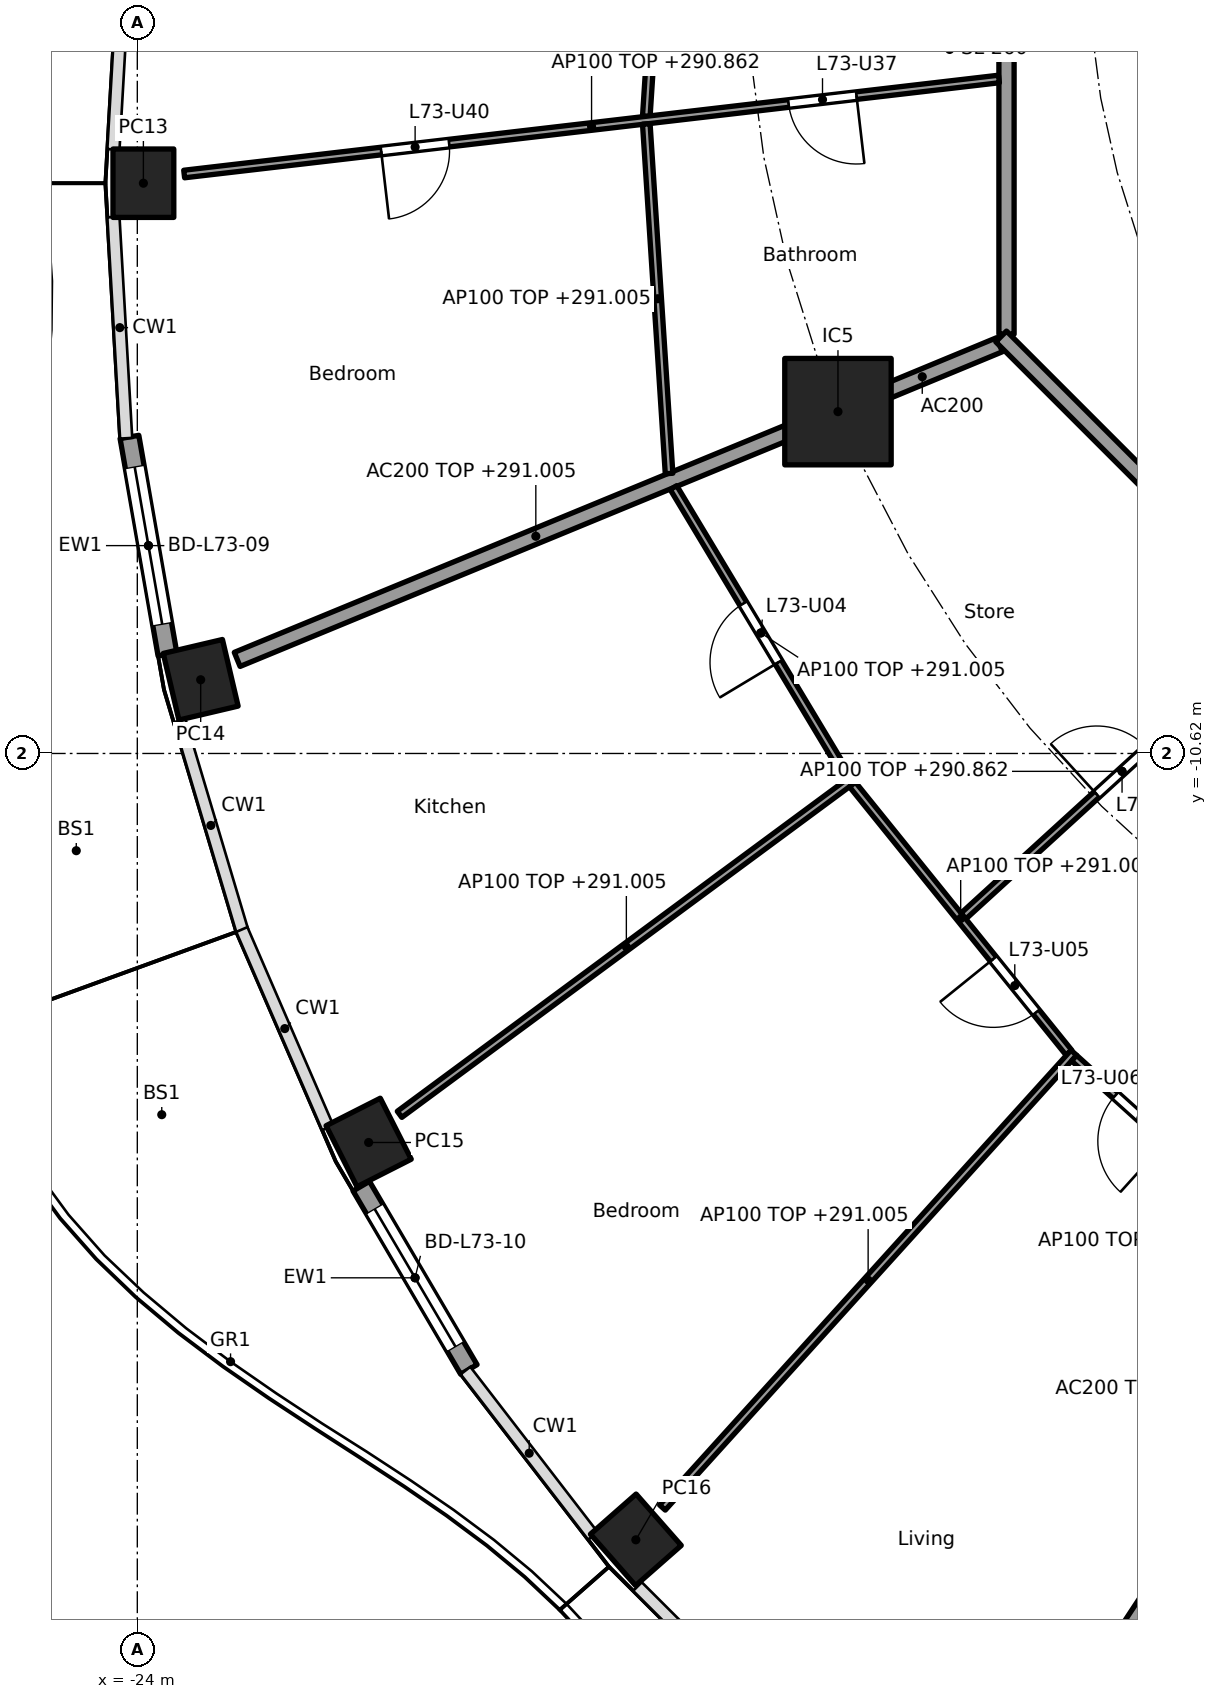
"""IFC4 building model, lengths in metres.
Left out: names, types, materials, properties, quantities, classifications, styles, units other than length and angle.
Written with IfcOpenShell. Run it as: python <this file> out.ifc"""

import sys

from ifc_helpers import new_model, si_unit, direction, frame, frame_2d, origin, origin_2d, place, context, subcontext, project, spatial, rectangle, hollow_rectangle, extrude, element, fill, save


model = new_model("IFC4")
c1 = context("Model", 3, precision=1e-05, world=origin(), true_north=direction((0.0, 1.0)))
c2 = subcontext(c1, "Body", "Model", "MODEL_VIEW")
j1 = project(units=[si_unit("LENGTHUNIT", "METRE"), si_unit("PLANEANGLEUNIT", "RADIAN")], contexts=[c1])
p1 = place(None, origin())
s1 = spatial("IfcSite", under=j1, at=p1, CompositionType="ELEMENT")
p2 = place(p1, origin())
s2 = spatial("IfcBuilding", under=s1, at=p2, CompositionType="ELEMENT")
p3 = place(p2, frame((0.0, 0.0, 288.1)))
s3 = spatial("IfcBuildingStorey", under=s2, at=p3, CompositionType="ELEMENT", Elevation=288.1)
for number, where, z_axis, x_axis in (
    (1, (-23.92, -3.118, 0.0), (0.0, 0.0, 1.0), (0.0, -1.0, 0.0)),
    (2, (-23.166, -9.65, 0.0), (0.0, 0.0, 1.0), (0.229, -0.973, 0.0)),
    (3, (-20.957, -15.738, 0.0), (0.0, 0.0, 1.0), (0.452, -0.892, 0.0)),
    (4, (-17.441, -20.965, 0.0), (0.0, 0.0, 1.0), (0.66, -0.751, 0.0)),
):
    element("IfcColumn", number, at=place(p3, frame(where, z_axis=z_axis, x_axis=x_axis)), inside=s3, PredefinedType="COLUMN", context=c2, shape_type="SweptSolid", body=[
        extrude(hollow_rectangle(XDim=0.9, YDim=0.8, WallThickness=0.028, at=origin_2d()), origin(), (0.0, 0.0, 1.0), 3.7),
    ])
p4 = place(p3, frame((-14.782, -6.123, 0.0), z_axis=(0.0, 0.0, 1.0), x_axis=(1.0, 0.0, 0.0)))
e5 = element("IfcColumn", 5, at=p4, inside=s3, PredefinedType="COLUMN", context=c2, shape_type="SweptSolid", body=[
    extrude(rectangle(XDim=1.4, YDim=1.4, at=origin_2d()), origin(), (0.0, 0.0, 1.0), 3.7),
])
p5 = place(p3, frame((-23.604, -9.315, 0.0), z_axis=(0.0, 0.0, 1.0), x_axis=(-0.172182411767, 0.985065082661, 0.0)))
e6 = element("IfcWall", 6, at=p5, inside=s3, PredefinedType="SOLIDWALL", context=c2, shape_type="SweptSolid", body=[
    extrude(rectangle(XDim=2.903, YDim=0.25, at=frame_2d((1.451, 0.0))), origin(), (0.0, 0.0, 1.0), 3.44),
])
p6 = place(p5, frame((0.401, 0.0, 0.0)))
e7 = element("IfcOpeningElement", 7, at=p6, cuts=e6, PredefinedType="OPENING", context=c2, shape_type="SweptSolid", body=[
    extrude(rectangle(XDim=2.1, YDim=2.4, at=frame_2d((1.05, 1.2))), frame((0.0, 0.135, 0.0), z_axis=(0.0, -1.0, 0.0), x_axis=(1.0, 0.0, 0.0)), (0.0, 0.0, 1.0), 0.27),
])
p7 = place(p3, frame((-19.638, -18.724, 0.0), z_axis=(0.0, 0.0, 1.0), x_axis=(-0.506371364425, 0.862315511452, 0.0)))
e8 = element("IfcWall", 8, at=p7, inside=s3, PredefinedType="SOLIDWALL", context=c2, shape_type="SweptSolid", body=[
    extrude(rectangle(XDim=2.796, YDim=0.25, at=frame_2d((1.398, 0.0))), origin(), (0.0, 0.0, 1.0), 3.44),
])
p8 = place(p7, frame((0.348, 0.0, 0.0)))
e9 = element("IfcOpeningElement", 9, at=p8, cuts=e8, PredefinedType="OPENING", context=c2, shape_type="SweptSolid", body=[
    extrude(rectangle(XDim=2.1, YDim=2.4, at=frame_2d((1.05, 1.2))), frame((0.0, 0.135, 0.0), z_axis=(0.0, -1.0, 0.0), x_axis=(1.0, 0.0, 0.0)), (0.0, 0.0, 1.0), 0.27),
])
p9 = place(p3, frame((-12.657, -5.243, 0.0), z_axis=(0.0, 0.0, 1.0), x_axis=(-0.923859888513, -0.38273085373, 0.0)))
e10 = element("IfcWall", 10, at=p9, inside=s3, PredefinedType="PARTITIONING", context=c2, shape_type="SweptSolid", body=[
    extrude(rectangle(XDim=2.199, YDim=0.2, at=frame_2d((1.1, 0.0))), origin(), (0.0, 0.0, 1.0), 3.44),
])
p10 = place(p3, frame((-14.828, -6.142, 0.0), z_axis=(0.0, 0.0, 1.0), x_axis=(-0.924478087429, -0.381235184451, 0.0)))
e11 = element("IfcWall", 11, at=p10, inside=s3, PredefinedType="PARTITIONING", context=c2, shape_type="SweptSolid", body=[
    extrude(rectangle(XDim=8.499, YDim=0.2, at=frame_2d((4.25, 0.0))), origin(), (0.0, 0.0, 1.0), 2.905),
])
p11 = place(p3, frame((-6.151, -14.824, 0.0), z_axis=(0.0, 0.0, 1.0), x_axis=(-0.549345577828, -0.835595258556, 0.0)))
e12 = element("IfcWall", 12, at=p11, inside=s3, PredefinedType="PARTITIONING", context=c2, shape_type="SweptSolid", body=[
    extrude(rectangle(XDim=11.62, YDim=0.2, at=frame_2d((5.81, 0.0))), origin(), (0.0, 0.0, 1.0), 2.905),
])
p12 = place(p3, frame((-12.565, 5.304, 0.0), z_axis=(0.0, 0.0, 1.0), x_axis=(0.0, -1.0, 0.0)))
e13 = element("IfcWall", 13, at=p12, inside=s3, PredefinedType="PARTITIONING", context=c2, shape_type="SweptSolid", body=[
    extrude(rectangle(XDim=10.409, YDim=0.2, at=frame_2d((5.205, 0.0))), origin(), (0.0, 0.0, 1.0), 3.44),
])
p13 = place(p12, frame((4.804, 0.0, 0.0)))
e14 = element("IfcOpeningElement", 14, at=p13, cuts=e13, PredefinedType="OPENING", context=c2, shape_type="SweptSolid", body=[
    extrude(rectangle(XDim=1.0, YDim=2.1, at=frame_2d((0.5, 1.05))), frame((0.0, 0.11, 0.0), z_axis=(0.0, -1.0, 0.0), x_axis=(1.0, 0.0, 0.0)), (0.0, 0.0, 1.0), 0.22),
])
p14 = place(p3, frame((-12.635, -5.134, 0.0), z_axis=(0.0, 0.0, 1.0), x_axis=(0.707106781187, -0.707106781187, 0.0)))
e15 = element("IfcWall", 15, at=p14, inside=s3, PredefinedType="PARTITIONING", context=c2, shape_type="SweptSolid", body=[
    extrude(rectangle(XDim=10.609, YDim=0.2, at=frame_2d((5.305, 0.0))), origin(), (0.0, 0.0, 1.0), 3.44),
])
p15 = place(p14, frame((6.539, 0.0, 0.0)))
e16 = element("IfcOpeningElement", 16, at=p15, cuts=e15, PredefinedType="OPENING", context=c2, shape_type="SweptSolid", body=[
    extrude(rectangle(XDim=1.0, YDim=2.1, at=frame_2d((0.5, 1.05))), frame((0.0, 0.11, 0.0), z_axis=(0.0, -1.0, 0.0), x_axis=(1.0, 0.0, 0.0)), (0.0, 0.0, 1.0), 0.22),
])
p16 = place(p3, frame((-17.002, 2.409, 0.0), z_axis=(0.0, 0.0, 1.0), x_axis=(-0.064855550758, -0.997894662545, 0.0)))
e17 = element("IfcWall", 17, at=p16, inside=s3, PredefinedType="PARTITIONING", context=c2, shape_type="SweptSolid", body=[
    extrude(rectangle(XDim=4.656, YDim=0.1, at=frame_2d((2.328, 0.0))), origin(), (0.0, 0.0, 1.0), 2.905),
])
p17 = place(p3, frame((-12.664, -1.746, 0.0), z_axis=(0.0, 0.0, 1.0), x_axis=(-0.993264397529, -0.115869912409, 0.0)))
e18 = element("IfcWall", 18, at=p17, inside=s3, PredefinedType="PARTITIONING", context=c2, shape_type="SweptSolid", body=[
    extrude(rectangle(XDim=10.792, YDim=0.1, at=frame_2d((5.396, 0.0))), origin(), (0.0, 0.0, 1.0), 2.762),
])
p18 = place(p17, frame((1.887, 0.0, 0.0)))
e19 = element("IfcOpeningElement", 19, at=p18, cuts=e18, PredefinedType="OPENING", context=c2, shape_type="SweptSolid", body=[
    extrude(rectangle(XDim=0.9, YDim=2.1, at=frame_2d((0.45, 1.05))), frame((0.0, 0.06, 0.0), z_axis=(0.0, -1.0, 0.0), x_axis=(1.0, 0.0, 0.0)), (0.0, 0.0, 1.0), 0.12),
])
p19 = place(p17, frame((7.283, 0.0, 0.0)))
e20 = element("IfcOpeningElement", 20, at=p19, cuts=e18, PredefinedType="OPENING", context=c2, shape_type="SweptSolid", body=[
    extrude(rectangle(XDim=0.9, YDim=2.1, at=frame_2d((0.45, 1.05))), frame((0.0, 0.06, 0.0), z_axis=(0.0, -1.0, 0.0), x_axis=(1.0, 0.0, 0.0)), (0.0, 0.0, 1.0), 0.12),
])
p20 = place(p3, frame((-17.304, -2.338, 0.0), z_axis=(0.0, 0.0, 1.0), x_axis=(0.06500001157, -0.997885263192, 0.0)))
e21 = element("IfcWall", 21, at=p20, inside=s3, PredefinedType="PARTITIONING", context=c2, shape_type="SweptSolid", body=[
    extrude(rectangle(XDim=4.609, YDim=0.1, at=frame_2d((2.304, 0.0))), origin(), (0.0, 0.0, 1.0), 2.905),
])
p21 = place(p3, frame((-16.946, -7.122, 0.0), z_axis=(0.0, 0.0, 1.0), x_axis=(0.514994556856, -0.857193447483, 0.0)))
e22 = element("IfcWall", 22, at=p21, inside=s3, PredefinedType="PARTITIONING", context=c2, shape_type="SweptSolid", body=[
    extrude(rectangle(XDim=4.462, YDim=0.1, at=frame_2d((2.231, 0.0))), origin(), (0.0, 0.0, 1.0), 2.905),
])
p22 = place(p21, frame((1.781, 0.0, 0.0)))
e23 = element("IfcOpeningElement", 23, at=p22, cuts=e22, PredefinedType="OPENING", context=c2, shape_type="SweptSolid", body=[
    extrude(rectangle(XDim=0.9, YDim=2.1, at=frame_2d((0.45, 1.05))), frame((0.0, 0.06, 0.0), z_axis=(0.0, -1.0, 0.0), x_axis=(1.0, 0.0, 0.0)), (0.0, 0.0, 1.0), 0.12),
])
p23 = place(p3, frame((-14.582, -10.96, 0.0), z_axis=(0.0, 0.0, 1.0), x_axis=(-0.804405200554, -0.594081032623, 0.0)))
e24 = element("IfcWall", 24, at=p23, inside=s3, PredefinedType="PARTITIONING", context=c2, shape_type="SweptSolid", body=[
    extrude(rectangle(XDim=7.418, YDim=0.1, at=frame_2d((3.709, 0.0))), origin(), (0.0, 0.0, 1.0), 2.905),
])
p24 = place(p3, frame((-14.591, -11.029, 0.0), z_axis=(0.0, 0.0, 1.0), x_axis=(0.628170338674, -0.778075848237, 0.0)))
e25 = element("IfcWall", 25, at=p24, inside=s3, PredefinedType="PARTITIONING", context=c2, shape_type="SweptSolid", body=[
    extrude(rectangle(XDim=4.532, YDim=0.1, at=frame_2d((2.266, 0.0))), origin(), (0.0, 0.0, 1.0), 2.905),
])
p25 = place(p24, frame((2.949, 0.0, 0.0)))
e26 = element("IfcOpeningElement", 26, at=p25, cuts=e25, PredefinedType="OPENING", context=c2, shape_type="SweptSolid", body=[
    extrude(rectangle(XDim=0.9, YDim=2.1, at=frame_2d((0.45, 1.05))), frame((0.0, 0.06, 0.0), z_axis=(0.0, -1.0, 0.0), x_axis=(1.0, 0.0, 0.0)), (0.0, 0.0, 1.0), 0.12),
])
p26 = place(p3, frame((-8.958, -8.952, 0.0), z_axis=(0.0, 0.0, 1.0), x_axis=(-0.73876526954, -0.673962815385, 0.0)))
e27 = element("IfcWall", 27, at=p26, inside=s3, PredefinedType="PARTITIONING", context=c2, shape_type="SweptSolid", body=[
    extrude(rectangle(XDim=5.647, YDim=0.1, at=frame_2d((2.824, 0.0))), origin(), (0.0, 0.0, 1.0), 2.762),
])
p27 = place(p26, frame((2.374, 0.0, 0.0)))
e28 = element("IfcOpeningElement", 28, at=p27, cuts=e27, PredefinedType="OPENING", context=c2, shape_type="SweptSolid", body=[
    extrude(rectangle(XDim=0.9, YDim=2.1, at=frame_2d((0.45, 1.05))), frame((0.0, 0.06, 0.0), z_axis=(0.0, -1.0, 0.0), x_axis=(1.0, 0.0, 0.0)), (0.0, 0.0, 1.0), 0.12),
])
p28 = place(p3, frame((-11.679, -14.557, 0.0), z_axis=(0.0, 0.0, 1.0), x_axis=(-0.670800011545, -0.741638284146, 0.0)))
e29 = element("IfcWall", 29, at=p28, inside=s3, PredefinedType="PARTITIONING", context=c2, shape_type="SweptSolid", body=[
    extrude(rectangle(XDim=8.068, YDim=0.1, at=frame_2d((4.034, 0.0))), origin(), (0.0, 0.0, 1.0), 2.905),
])
p29 = place(p3, frame((-11.676, -14.628, 0.0), z_axis=(0.0, 0.0, 1.0), x_axis=(0.74245829867, -0.669892285921, 0.0)))
e30 = element("IfcWall", 30, at=p29, inside=s3, PredefinedType="PARTITIONING", context=c2, shape_type="SweptSolid", body=[
    extrude(rectangle(XDim=4.68, YDim=0.1, at=frame_2d((2.34, 0.0))), origin(), (0.0, 0.0, 1.0), 2.905),
])
p30 = place(p29, frame((0.732, 0.0, 0.0)))
e31 = element("IfcOpeningElement", 31, at=p30, cuts=e30, PredefinedType="OPENING", context=c2, shape_type="SweptSolid", body=[
    extrude(rectangle(XDim=0.9, YDim=2.1, at=frame_2d((0.45, 1.05))), frame((0.0, 0.06, 0.0), z_axis=(0.0, -1.0, 0.0), x_axis=(1.0, 0.0, 0.0)), (0.0, 0.0, 1.0), 0.12),
])
p31 = place(p6, origin())
e32 = element("IfcDoor", 32, at=p31, inside=s3, OperationType="SLIDING_TO_LEFT", PredefinedType="DOOR", context=c2, shape_type="SweptSolid", body=[
    extrude(rectangle(XDim=2.1, YDim=2.4, at=frame_2d((1.05, 1.2))), frame((0.0, 0.025, 0.0), z_axis=(0.0, -1.0, 0.0), x_axis=(1.0, 0.0, 0.0)), (0.0, 0.0, 1.0), 0.05),
])
fill(e7, e32)
p32 = place(p8, origin())
e33 = element("IfcDoor", 33, at=p32, inside=s3, OperationType="SLIDING_TO_LEFT", PredefinedType="DOOR", context=c2, shape_type="SweptSolid", body=[
    extrude(rectangle(XDim=2.1, YDim=2.4, at=frame_2d((1.05, 1.2))), frame((0.0, 0.025, 0.0), z_axis=(0.0, -1.0, 0.0), x_axis=(1.0, 0.0, 0.0)), (0.0, 0.0, 1.0), 0.05),
])
fill(e9, e33)
p33 = place(p27, frame((0.9, 0.0, 0.0), x_axis=(-1.0, 0.0, 0.0)))
e34 = element("IfcDoor", 34, at=p33, inside=s3, OperationType="SINGLE_SWING_LEFT", PredefinedType="DOOR", context=c2, shape_type="SweptSolid", body=[
    extrude(rectangle(XDim=0.9, YDim=2.1, at=frame_2d((0.45, 1.05))), frame((0.0, 0.025, 0.0), z_axis=(0.0, -1.0, 0.0), x_axis=(1.0, 0.0, 0.0)), (0.0, 0.0, 1.0), 0.05),
])
fill(e28, e34)
p34 = place(p22, frame((0.9, 0.0, 0.0), x_axis=(-1.0, 0.0, 0.0)))
e35 = element("IfcDoor", 35, at=p34, inside=s3, OperationType="SINGLE_SWING_LEFT", PredefinedType="DOOR", context=c2, shape_type="SweptSolid", body=[
    extrude(rectangle(XDim=0.9, YDim=2.1, at=frame_2d((0.45, 1.05))), frame((0.0, 0.025, 0.0), z_axis=(0.0, -1.0, 0.0), x_axis=(1.0, 0.0, 0.0)), (0.0, 0.0, 1.0), 0.05),
])
fill(e23, e35)
p35 = place(p25, frame((0.9, 0.0, 0.0), x_axis=(-1.0, 0.0, 0.0)))
e36 = element("IfcDoor", 36, at=p35, inside=s3, OperationType="SINGLE_SWING_RIGHT", PredefinedType="DOOR", context=c2, shape_type="SweptSolid", body=[
    extrude(rectangle(XDim=0.9, YDim=2.1, at=frame_2d((0.45, 1.05))), frame((0.0, 0.025, 0.0), z_axis=(0.0, -1.0, 0.0), x_axis=(1.0, 0.0, 0.0)), (0.0, 0.0, 1.0), 0.05),
])
fill(e26, e36)
p36 = place(p30, frame((0.9, 0.0, 0.0), x_axis=(-1.0, 0.0, 0.0)))
e37 = element("IfcDoor", 37, at=p36, inside=s3, OperationType="SINGLE_SWING_LEFT", PredefinedType="DOOR", context=c2, shape_type="SweptSolid", body=[
    extrude(rectangle(XDim=0.9, YDim=2.1, at=frame_2d((0.45, 1.05))), frame((0.0, 0.025, 0.0), z_axis=(0.0, -1.0, 0.0), x_axis=(1.0, 0.0, 0.0)), (0.0, 0.0, 1.0), 0.05),
])
fill(e31, e37)
p37 = place(p18, origin())
e38 = element("IfcDoor", 38, at=p37, inside=s3, OperationType="SINGLE_SWING_LEFT", PredefinedType="DOOR", context=c2, shape_type="SweptSolid", body=[
    extrude(rectangle(XDim=0.9, YDim=2.1, at=frame_2d((0.45, 1.05))), frame((0.0, 0.025, 0.0), z_axis=(0.0, -1.0, 0.0), x_axis=(1.0, 0.0, 0.0)), (0.0, 0.0, 1.0), 0.05),
])
fill(e19, e38)
p38 = place(p19, origin())
e39 = element("IfcDoor", 39, at=p38, inside=s3, OperationType="SINGLE_SWING_RIGHT", PredefinedType="DOOR", context=c2, shape_type="SweptSolid", body=[
    extrude(rectangle(XDim=0.9, YDim=2.1, at=frame_2d((0.45, 1.05))), frame((0.0, 0.025, 0.0), z_axis=(0.0, -1.0, 0.0), x_axis=(1.0, 0.0, 0.0)), (0.0, 0.0, 1.0), 0.05),
])
fill(e20, e39)
save(model, sys.argv[1])
